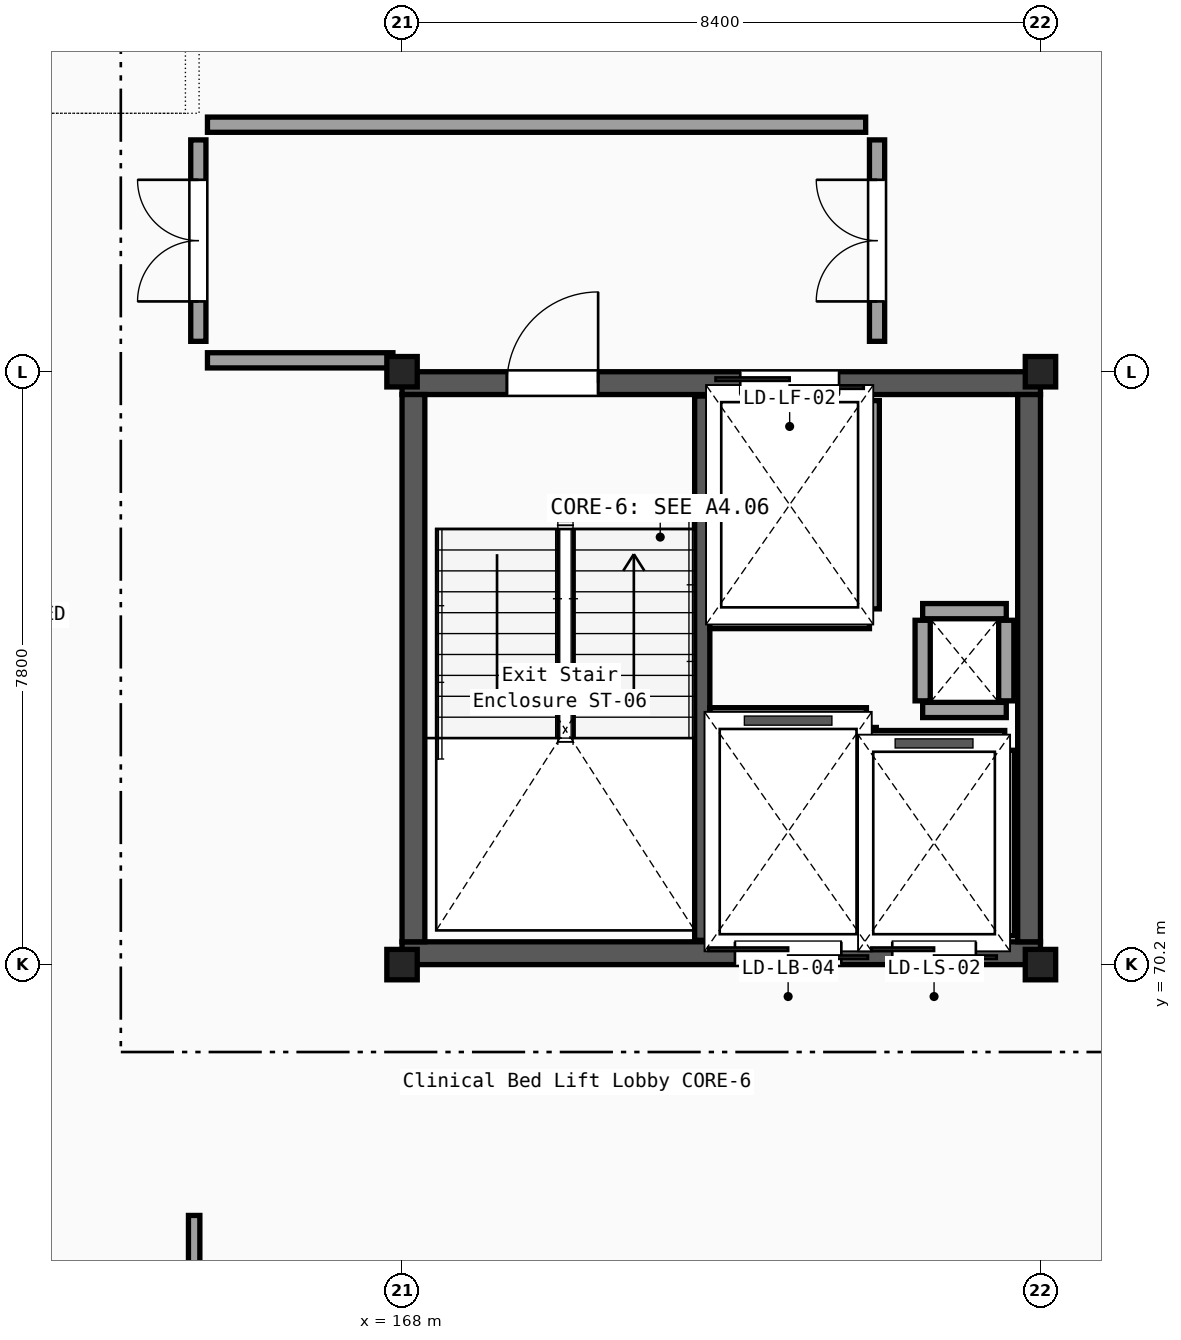
"""IFC4 building model, lengths in metres.
Left out: names, types, materials, properties, quantities, classifications, styles, units other than length and angle.
Written with IfcOpenShell. Run it as: python <this file> out.ifc"""

import sys

from ifc_helpers import new_model, si_unit, direction, frame, frame_2d, origin, origin_2d, place, context, subcontext, project, spatial, rectangle, i_section, extrude, element, fill, save


model = new_model("IFC4")
c1 = context("Model", 3, precision=1e-05, world=origin(), true_north=direction((0.0, 1.0)))
c2 = subcontext(c1, "Body", "Model", "MODEL_VIEW")
j1 = project(units=[si_unit("LENGTHUNIT", "METRE"), si_unit("PLANEANGLEUNIT", "RADIAN")], contexts=[c1])
p1 = place(None, origin())
s1 = spatial("IfcSite", under=j1, at=p1, CompositionType="ELEMENT")
p2 = place(p1, origin())
s2 = spatial("IfcBuilding", under=s1, at=p2, CompositionType="ELEMENT")
p3 = place(p2, frame((0.0, 0.0, 27.0)))
s3 = spatial("IfcBuildingStorey", under=s2, at=p3, CompositionType="ELEMENT", Elevation=27.0)
for number, where, z_axis, x_axis in (
    (1, (168.0, 70.2, 0.0), (0.0, 0.0, 1.0), (1.0, 0.0, 0.0)),
    (2, (168.0, 78.0, 0.0), (0.0, 0.0, 1.0), (1.0, 0.0, 0.0)),
    (3, (176.4, 70.2, 0.0), (0.0, 0.0, 1.0), (1.0, 0.0, 0.0)),
    (4, (176.4, 78.0, 0.0), (0.0, 0.0, 1.0), (1.0, 0.0, 0.0)),
):
    element("IfcColumn", number, at=place(p3, frame(where, z_axis=z_axis, x_axis=x_axis)), inside=s3, PredefinedType="COLUMN", context=c2, shape_type="SweptSolid", body=[
        extrude(i_section(OverallWidth=0.3, OverallDepth=0.4, WebThickness=0.013, FlangeThickness=0.024, FilletRadius=0.027, at=origin_2d()), origin(), (0.0, 0.0, 1.0), 4.05),
    ])
p4 = place(p3, frame((168.0, 70.35, 0.0), z_axis=(0.0, 0.0, 1.0), x_axis=(1.0, 0.0, 0.0)))
e5 = element("IfcWall", 5, at=p4, inside=s3, PredefinedType="SHEAR", context=c2, shape_type="SweptSolid", body=[
    extrude(rectangle(XDim=8.4, YDim=0.3, at=frame_2d((4.2, 0.0))), origin(), (0.0, 0.0, 1.0), 3.83),
])
p5 = place(p4, frame((4.38, 0.0, 0.0)))
e6 = element("IfcOpeningElement", 6, at=p5, cuts=e5, PredefinedType="OPENING", context=c2, shape_type="SweptSolid", body=[
    extrude(rectangle(XDim=1.4, YDim=2.2, at=frame_2d((0.7, 1.1))), frame((0.0, 0.16, 0.0), z_axis=(0.0, -1.0, 0.0), x_axis=(1.0, 0.0, 0.0)), (0.0, 0.0, 1.0), 0.32),
])
p6 = place(p4, frame((6.45, 0.0, 0.0)))
e7 = element("IfcOpeningElement", 7, at=p6, cuts=e5, PredefinedType="OPENING", context=c2, shape_type="SweptSolid", body=[
    extrude(rectangle(XDim=1.1, YDim=2.15, at=frame_2d((0.55, 1.075))), frame((0.0, 0.16, 0.0), z_axis=(0.0, -1.0, 0.0), x_axis=(1.0, 0.0, 0.0)), (0.0, 0.0, 1.0), 0.32),
])
p7 = place(p3, frame((168.0, 77.85, 0.0), z_axis=(0.0, 0.0, 1.0), x_axis=(1.0, 0.0, 0.0)))
e8 = element("IfcWall", 8, at=p7, inside=s3, PredefinedType="SHEAR", context=c2, shape_type="SweptSolid", body=[
    extrude(rectangle(XDim=8.4, YDim=0.3, at=frame_2d((4.2, 0.0))), origin(), (0.0, 0.0, 1.0), 3.83),
])
p8 = place(p7, frame((1.38, 0.0, 0.0)))
e9 = element("IfcOpeningElement", 9, at=p8, cuts=e8, PredefinedType="OPENING", context=c2, shape_type="SweptSolid", body=[
    extrude(rectangle(XDim=1.2, YDim=2.15, at=frame_2d((0.6, 1.075))), frame((0.0, 0.16, 0.0), z_axis=(0.0, -1.0, 0.0), x_axis=(1.0, 0.0, 0.0)), (0.0, 0.0, 1.0), 0.32),
])
p9 = place(p7, frame((4.45, 0.0, 0.0)))
e10 = element("IfcOpeningElement", 10, at=p9, cuts=e8, PredefinedType="OPENING", context=c2, shape_type="SweptSolid", body=[
    extrude(rectangle(XDim=1.3, YDim=2.2, at=frame_2d((0.65, 1.1))), frame((0.0, 0.16, 0.0), z_axis=(0.0, -1.0, 0.0), x_axis=(1.0, 0.0, 0.0)), (0.0, 0.0, 1.0), 0.32),
])
for number, where, z_axis, x_axis in (
    (11, (168.15, 70.5, 0.0), (0.0, 0.0, 1.0), (0.0, 1.0, 0.0)),
    (12, (176.25, 70.5, 0.0), (0.0, 0.0, 1.0), (0.0, 1.0, 0.0)),
):
    element("IfcWall", number, at=place(p3, frame(where, z_axis=z_axis, x_axis=x_axis)), inside=s3, PredefinedType="SHEAR", context=c2, shape_type="SweptSolid", body=[
        extrude(rectangle(XDim=7.2, YDim=0.3, at=frame_2d((3.6, 0.0))), origin(), (0.0, 0.0, 1.0), 3.83),
    ])
p10 = place(p3, frame((171.95, 70.52, 0.0), z_axis=(0.0, 0.0, 1.0), x_axis=(0.0, 1.0, 0.0)))
e13 = element("IfcWall", 13, at=p10, inside=s3, PredefinedType="SHEAR", context=c2, shape_type="SweptSolid", body=[
    extrude(rectangle(XDim=7.16, YDim=0.2, at=frame_2d((3.58, 0.0))), origin(), (0.0, 0.0, 1.0), 3.83),
])
for number, where, z_axis, x_axis in (
    (14, (174.85, 73.55, 0.0), (0.0, 0.0, 1.0), (1.0, 0.0, 0.0)),
    (15, (174.85, 74.85, 0.0), (0.0, 0.0, 1.0), (1.0, 0.0, 0.0)),
):
    element("IfcWall", number, at=place(p3, frame(where, z_axis=z_axis, x_axis=x_axis)), inside=s3, PredefinedType="PARTITIONING", context=c2, shape_type="SweptSolid", body=[
        extrude(rectangle(XDim=1.1, YDim=0.2, at=frame_2d((0.55, 0.0))), origin(), (0.0, 0.0, 1.0), 3.26),
    ])
for number, where, z_axis, x_axis in (
    (16, (174.85, 73.67, 0.0), (0.0, 0.0, 1.0), (0.0, 1.0, 0.0)),
    (17, (175.95, 73.67, 0.0), (0.0, 0.0, 1.0), (0.0, 1.0, 0.0)),
):
    element("IfcWall", number, at=place(p3, frame(where, z_axis=z_axis, x_axis=x_axis)), inside=s3, PredefinedType="PARTITIONING", context=c2, shape_type="SweptSolid", body=[
        extrude(rectangle(XDim=1.06, YDim=0.2, at=frame_2d((0.53, 0.0))), origin(), (0.0, 0.0, 1.0), 3.26),
    ])
p11 = place(p3, frame((174.18, 74.88, 0.0), z_axis=(0.0, 0.0, 1.0), x_axis=(0.0, 1.0, 0.0)))
e18 = element("IfcWall", 18, at=p11, inside=s3, PredefinedType="PARTITIONING", context=c2, shape_type="SweptSolid", body=[
    extrude(rectangle(XDim=2.74, YDim=0.2, at=frame_2d((1.37, 0.0))), origin(), (0.0, 0.0, 1.0), 3.26),
])
p12 = place(p3, frame((172.05, 74.72, 0.0), z_axis=(0.0, 0.0, 1.0), x_axis=(1.0, 0.0, 0.0)))
e19 = element("IfcWall", 19, at=p12, inside=s3, PredefinedType="PARTITIONING", context=c2, shape_type="SweptSolid", body=[
    extrude(rectangle(XDim=2.1, YDim=0.2, at=frame_2d((1.05, 0.0))), origin(), (0.0, 0.0, 1.0), 3.26),
])
p13 = place(p3, frame((174.14, 70.58, 0.0), z_axis=(0.0, 0.0, 1.0), x_axis=(0.0, 1.0, 0.0)))
e20 = element("IfcWall", 20, at=p13, inside=s3, PredefinedType="PARTITIONING", context=c2, shape_type="SweptSolid", body=[
    extrude(rectangle(XDim=2.74, YDim=0.2, at=frame_2d((1.37, 0.0))), origin(), (0.0, 0.0, 1.0), 3.26),
])
p14 = place(p3, frame((172.05, 73.48, 0.0), z_axis=(0.0, 0.0, 1.0), x_axis=(1.0, 0.0, 0.0)))
e21 = element("IfcWall", 21, at=p14, inside=s3, PredefinedType="PARTITIONING", context=c2, shape_type="SweptSolid", body=[
    extrude(rectangle(XDim=2.06, YDim=0.2, at=frame_2d((1.03, 0.0))), origin(), (0.0, 0.0, 1.0), 3.26),
])
p15 = place(p3, frame((175.96, 70.58, 0.0), z_axis=(0.0, 0.0, 1.0), x_axis=(0.0, 1.0, 0.0)))
e22 = element("IfcWall", 22, at=p15, inside=s3, PredefinedType="PARTITIONING", context=c2, shape_type="SweptSolid", body=[
    extrude(rectangle(XDim=2.44, YDim=0.2, at=frame_2d((1.22, 0.0))), origin(), (0.0, 0.0, 1.0), 3.26),
])
p16 = place(p3, frame((174.07, 73.18, 0.0), z_axis=(0.0, 0.0, 1.0), x_axis=(1.0, 0.0, 0.0)))
e23 = element("IfcWall", 23, at=p16, inside=s3, PredefinedType="PARTITIONING", context=c2, shape_type="SweptSolid", body=[
    extrude(rectangle(XDim=1.86, YDim=0.2, at=frame_2d((0.93, 0.0))), origin(), (0.0, 0.0, 1.0), 3.26),
])
p17 = place(p3, frame((165.44, 78.15, 0.0), z_axis=(0.0, 0.0, 1.0), x_axis=(1.0, 0.0, 0.0)))
e24 = element("IfcWall", 24, at=p17, inside=s3, PredefinedType="PARTITIONING", context=c2, shape_type="SweptSolid", body=[
    extrude(rectangle(XDim=2.44, YDim=0.2, at=frame_2d((1.22, 0.0))), origin(), (0.0, 0.0, 1.0), 3.26),
])
p18 = place(p3, frame((165.44, 81.25, 0.0), z_axis=(0.0, 0.0, 1.0), x_axis=(1.0, 0.0, 0.0)))
e25 = element("IfcWall", 25, at=p18, inside=s3, PredefinedType="PARTITIONING", context=c2, shape_type="SweptSolid", body=[
    extrude(rectangle(XDim=8.66, YDim=0.2, at=frame_2d((4.33, 0.0))), origin(), (0.0, 0.0, 1.0), 3.26),
])
p19 = place(p3, frame((165.32, 78.4, 0.0), z_axis=(0.0, 0.0, 1.0), x_axis=(0.0, 1.0, 0.0)))
e26 = element("IfcWall", 26, at=p19, inside=s3, PredefinedType="PARTITIONING", context=c2, shape_type="SweptSolid", body=[
    extrude(rectangle(XDim=2.65, YDim=0.2, at=frame_2d((1.325, 0.0))), origin(), (0.0, 0.0, 1.0), 3.26),
])
p20 = place(p19, frame((0.525, 0.0, 0.0)))
e27 = element("IfcOpeningElement", 27, at=p20, cuts=e26, PredefinedType="OPENING", context=c2, shape_type="SweptSolid", body=[
    extrude(rectangle(XDim=1.6, YDim=2.2, at=frame_2d((0.8, 1.1))), frame((0.0, 0.11, 0.0), z_axis=(0.0, -1.0, 0.0), x_axis=(1.0, 0.0, 0.0)), (0.0, 0.0, 1.0), 0.22),
])
p21 = place(p3, frame((174.25, 78.4, 0.0), z_axis=(0.0, 0.0, 1.0), x_axis=(0.0, 1.0, 0.0)))
e28 = element("IfcWall", 28, at=p21, inside=s3, PredefinedType="PARTITIONING", context=c2, shape_type="SweptSolid", body=[
    extrude(rectangle(XDim=2.65, YDim=0.2, at=frame_2d((1.325, 0.0))), origin(), (0.0, 0.0, 1.0), 3.26),
])
p22 = place(p21, frame((0.525, 0.0, 0.0)))
e29 = element("IfcOpeningElement", 29, at=p22, cuts=e28, PredefinedType="OPENING", context=c2, shape_type="SweptSolid", body=[
    extrude(rectangle(XDim=1.6, YDim=2.2, at=frame_2d((0.8, 1.1))), frame((0.0, 0.11, 0.0), z_axis=(0.0, -1.0, 0.0), x_axis=(1.0, 0.0, 0.0)), (0.0, 0.0, 1.0), 0.22),
])
p23 = place(p3, frame((165.265, 58.25, 0.0), z_axis=(0.0, 0.0, 1.0), x_axis=(0.0, 1.0, 0.0)))
e30 = element("IfcWall", 30, at=p23, inside=s3, PredefinedType="PARTITIONING", context=c2, shape_type="SweptSolid", body=[
    extrude(rectangle(XDim=8.65, YDim=0.15, at=frame_2d((4.325, 0.0))), origin(), (0.0, 0.0, 1.0), 3.26),
])
p24 = place(p23, frame((3.8, 0.0, 0.0)))
e31 = element("IfcOpeningElement", 31, at=p24, cuts=e30, PredefinedType="OPENING", context=c2, shape_type="SweptSolid", body=[
    extrude(rectangle(XDim=1.05, YDim=2.15, at=frame_2d((0.525, 1.075))), frame((0.0, 0.085, 0.0), z_axis=(0.0, -1.0, 0.0), x_axis=(1.0, 0.0, 0.0)), (0.0, 0.0, 1.0), 0.17),
])
p25 = place(p8, origin())
e32 = element("IfcDoor", 32, at=p25, inside=s3, OperationType="SINGLE_SWING_RIGHT", PredefinedType="DOOR", context=c2, shape_type="SweptSolid", body=[
    extrude(rectangle(XDim=1.2, YDim=2.15, at=frame_2d((0.6, 1.075))), frame((0.0, 0.025, 0.0), z_axis=(0.0, -1.0, 0.0), x_axis=(1.0, 0.0, 0.0)), (0.0, 0.0, 1.0), 0.05),
])
fill(e9, e32)
p26 = place(p9, origin())
e33 = element("IfcDoor", 33, at=p26, inside=s3, OperationType="DOUBLE_DOOR_SLIDING", PredefinedType="DOOR", context=c2, shape_type="SweptSolid", body=[
    extrude(rectangle(XDim=1.3, YDim=2.2, at=frame_2d((0.65, 1.1))), frame((0.0, 0.025, 0.0), z_axis=(0.0, -1.0, 0.0), x_axis=(1.0, 0.0, 0.0)), (0.0, 0.0, 1.0), 0.05),
])
fill(e10, e33)
p27 = place(p5, origin())
e34 = element("IfcDoor", 34, at=p27, inside=s3, OperationType="DOUBLE_DOOR_SLIDING", PredefinedType="DOOR", context=c2, shape_type="SweptSolid", body=[
    extrude(rectangle(XDim=1.4, YDim=2.2, at=frame_2d((0.7, 1.1))), frame((0.0, 0.025, 0.0), z_axis=(0.0, -1.0, 0.0), x_axis=(1.0, 0.0, 0.0)), (0.0, 0.0, 1.0), 0.05),
])
fill(e6, e34)
p28 = place(p6, origin())
e35 = element("IfcDoor", 35, at=p28, inside=s3, OperationType="DOUBLE_DOOR_SLIDING", PredefinedType="DOOR", context=c2, shape_type="SweptSolid", body=[
    extrude(rectangle(XDim=1.1, YDim=2.15, at=frame_2d((0.55, 1.075))), frame((0.0, 0.025, 0.0), z_axis=(0.0, -1.0, 0.0), x_axis=(1.0, 0.0, 0.0)), (0.0, 0.0, 1.0), 0.05),
])
fill(e7, e35)
p29 = place(p20, origin())
e36 = element("IfcDoor", 36, at=p29, inside=s3, OperationType="DOUBLE_DOOR_SINGLE_SWING", PredefinedType="DOOR", context=c2, shape_type="SweptSolid", body=[
    extrude(rectangle(XDim=1.6, YDim=2.2, at=frame_2d((0.8, 1.1))), frame((0.0, 0.025, 0.0), z_axis=(0.0, -1.0, 0.0), x_axis=(1.0, 0.0, 0.0)), (0.0, 0.0, 1.0), 0.05),
])
fill(e27, e36)
p30 = place(p22, origin())
e37 = element("IfcDoor", 37, at=p30, inside=s3, OperationType="DOUBLE_DOOR_SINGLE_SWING", PredefinedType="DOOR", context=c2, shape_type="SweptSolid", body=[
    extrude(rectangle(XDim=1.6, YDim=2.2, at=frame_2d((0.8, 1.1))), frame((0.0, 0.025, 0.0), z_axis=(0.0, -1.0, 0.0), x_axis=(1.0, 0.0, 0.0)), (0.0, 0.0, 1.0), 0.05),
])
fill(e29, e37)
save(model, sys.argv[1])
